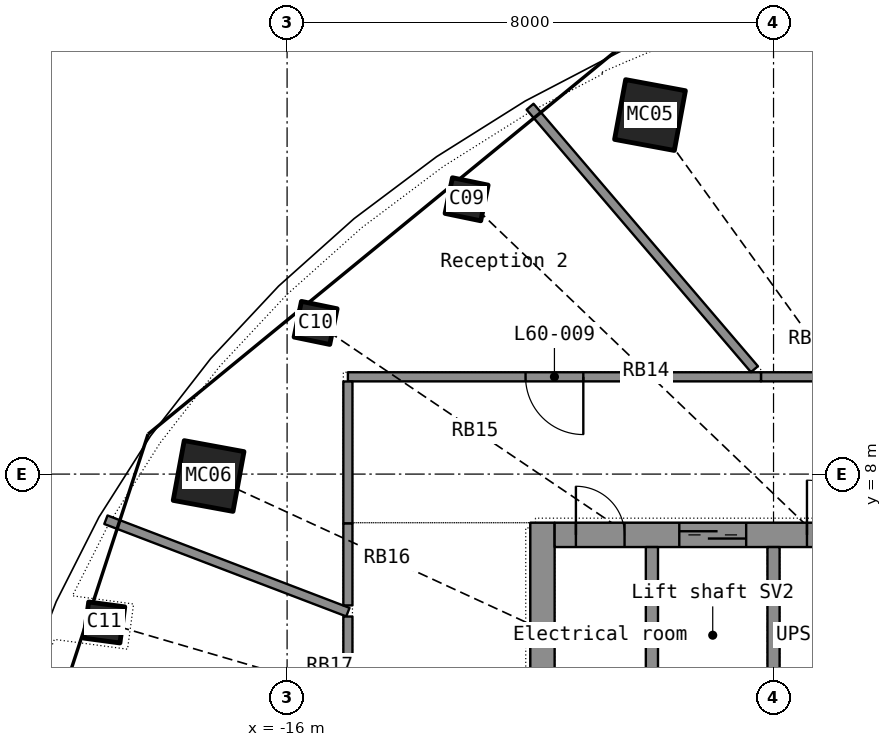
"""IFC4 building model, lengths in metres.
Left out: names, types, materials, properties, quantities, classifications, styles, units other than length and angle.
Written with IfcOpenShell. Run it as: python <this file> out.ifc"""

import sys

from ifc_helpers import new_model, si_unit, direction, frame, frame_2d, origin, origin_2d, place, context, subcontext, project, spatial, rectangle, hollow_rectangle, extrude, element, fill, save


model = new_model("IFC4")
c1 = context("Model", 3, precision=1e-05, world=origin(), true_north=direction((0.0, 1.0)))
c2 = subcontext(c1, "Body", "Model", "MODEL_VIEW")
j1 = project(units=[si_unit("LENGTHUNIT", "METRE"), si_unit("PLANEANGLEUNIT", "RADIAN")], contexts=[c1])
p1 = place(None, origin())
s1 = spatial("IfcSite", under=j1, at=p1, CompositionType="ELEMENT")
p2 = place(p1, origin())
s2 = spatial("IfcBuilding", under=s1, at=p2, CompositionType="ELEMENT")
p3 = place(p2, frame((0.0, 0.0, 246.7)))
s3 = spatial("IfcBuildingStorey", under=s2, at=p3, CompositionType="ELEMENT", Elevation=246.7)
p4 = place(p3, frame((-10.031, 13.905, 0.0), z_axis=(0.017280237, -0.024535299, 0.999549605), x_axis=(0.908759144, 0.417285179, -0.00546782)))
e1 = element("IfcColumn", 1, at=p4, inside=s3, PredefinedType="COLUMN", context=c2, shape_type="SweptSolid", body=[
    extrude(hollow_rectangle(XDim=1.0, YDim=1.0, WallThickness=0.032, at=origin_2d()), origin(), (0.0, 0.0, 1.0), 3.702),
])
p5 = place(p3, frame((-13.048, 12.52, 0.0), z_axis=(0.022226156, -0.021698532, 0.999517469), x_axis=(0.828897347, 0.55936539, -0.006288828)))
e2 = element("IfcColumn", 2, at=p5, inside=s3, PredefinedType="COLUMN", context=c2, shape_type="SweptSolid", body=[
    extrude(hollow_rectangle(XDim=0.6, YDim=0.6, WallThickness=0.025, at=origin_2d()), origin(), (0.0, 0.0, 1.0), 3.702),
])
p6 = place(p3, frame((-15.531, 10.486, 0.0), z_axis=(0.026512179, -0.018202391, 0.999482755), x_axis=(0.720903024, 0.693005453, -0.006501716)))
e3 = element("IfcColumn", 3, at=p6, inside=s3, PredefinedType="COLUMN", context=c2, shape_type="SweptSolid", body=[
    extrude(hollow_rectangle(XDim=0.6, YDim=0.6, WallThickness=0.025, at=origin_2d()), origin(), (0.0, 0.0, 1.0), 3.702),
])
p7 = place(p3, frame((-17.291, 7.969, 0.0), z_axis=(0.030006556, -0.014178922, 0.999449131), x_axis=(0.583833922, 0.81185086, -0.006010986)))
e4 = element("IfcColumn", 4, at=p7, inside=s3, PredefinedType="COLUMN", context=c2, shape_type="SweptSolid", body=[
    extrude(hollow_rectangle(XDim=1.0, YDim=1.0, WallThickness=0.032, at=origin_2d()), origin(), (0.0, 0.0, 1.0), 3.702),
])
p8 = place(p3, frame((-19.006, 5.559, 0.0), z_axis=(0.032511812, -0.009628245, 0.999424974), x_axis=(0.409044671, 0.912503187, -0.004515576)))
e5 = element("IfcColumn", 5, at=p8, inside=s3, PredefinedType="COLUMN", context=c2, shape_type="SweptSolid", body=[
    extrude(hollow_rectangle(XDim=0.6, YDim=0.6, WallThickness=0.025, at=origin_2d()), origin(), (0.0, 0.0, 1.0), 3.702),
])
p9 = place(p3, frame((-11.8, -7.2, 0.0), z_axis=(0.0, 0.0, 1.0), x_axis=(0.0, 1.0, 0.0)))
e6 = element("IfcWall", 6, at=p9, inside=s3, PredefinedType="SHEAR", context=c2, shape_type="SweptSolid", body=[
    extrude(rectangle(XDim=14.4, YDim=0.4, at=frame_2d((7.2, 0.0))), origin(), (0.0, 0.0, 1.0), 3.3),
])
p10 = place(p9, frame((6.5, 0.0, 0.0)))
e7 = element("IfcOpeningElement", 7, at=p10, cuts=e6, PredefinedType="OPENING", context=c2, shape_type="SweptSolid", body=[
    extrude(rectangle(XDim=1.4, YDim=2.2, at=frame_2d((0.7, 1.1))), frame((0.0, 0.21, 0.0), z_axis=(0.0, -1.0, 0.0), x_axis=(1.0, 0.0, 0.0)), (0.0, 0.0, 1.0), 0.42),
])
p11 = place(p3, frame((-11.6, 7.0, 0.0), z_axis=(0.0, 0.0, 1.0), x_axis=(1.0, 0.0, 0.0)))
e8 = element("IfcWall", 8, at=p11, inside=s3, PredefinedType="SHEAR", context=c2, shape_type="SweptSolid", body=[
    extrude(rectangle(XDim=23.2, YDim=0.4, at=frame_2d((11.6, 0.0))), origin(), (0.0, 0.0, 1.0), 3.3),
])
p12 = place(p11, frame((2.05, 0.0, 0.0)))
e9 = element("IfcOpeningElement", 9, at=p12, cuts=e8, PredefinedType="OPENING", context=c2, shape_type="SweptSolid", body=[
    extrude(rectangle(XDim=1.1, YDim=2.2, at=frame_2d((0.55, 1.1))), frame((0.0, 0.21, 0.0), z_axis=(0.0, -1.0, 0.0), x_axis=(1.0, 0.0, 0.0)), (0.0, 0.0, 1.0), 0.42),
])
p13 = place(p11, frame((6.05, 0.0, 0.0)))
e10 = element("IfcOpeningElement", 10, at=p13, cuts=e8, PredefinedType="OPENING", context=c2, shape_type="SweptSolid", body=[
    extrude(rectangle(XDim=1.1, YDim=2.2, at=frame_2d((0.55, 1.1))), frame((0.0, 0.21, 0.0), z_axis=(0.0, -1.0, 0.0), x_axis=(1.0, 0.0, 0.0)), (0.0, 0.0, 1.0), 0.42),
])
p14 = place(p11, frame((8.05, 0.0, 0.0)))
e11 = element("IfcOpeningElement", 11, at=p14, cuts=e8, PredefinedType="OPENING", context=c2, shape_type="SweptSolid", body=[
    extrude(rectangle(XDim=1.1, YDim=2.2, at=frame_2d((0.55, 1.1))), frame((0.0, 0.21, 0.0), z_axis=(0.0, -1.0, 0.0), x_axis=(1.0, 0.0, 0.0)), (0.0, 0.0, 1.0), 0.42),
])
p15 = place(p11, frame((10.05, 0.0, 0.0)))
e12 = element("IfcOpeningElement", 12, at=p15, cuts=e8, PredefinedType="OPENING", context=c2, shape_type="SweptSolid", body=[
    extrude(rectangle(XDim=1.1, YDim=2.2, at=frame_2d((0.55, 1.1))), frame((0.0, 0.21, 0.0), z_axis=(0.0, -1.0, 0.0), x_axis=(1.0, 0.0, 0.0)), (0.0, 0.0, 1.0), 0.42),
])
p16 = place(p11, frame((12.05, 0.0, 0.0)))
e13 = element("IfcOpeningElement", 13, at=p16, cuts=e8, PredefinedType="OPENING", context=c2, shape_type="SweptSolid", body=[
    extrude(rectangle(XDim=1.1, YDim=2.2, at=frame_2d((0.55, 1.1))), frame((0.0, 0.21, 0.0), z_axis=(0.0, -1.0, 0.0), x_axis=(1.0, 0.0, 0.0)), (0.0, 0.0, 1.0), 0.42),
])
p17 = place(p11, frame((14.05, 0.0, 0.0)))
e14 = element("IfcOpeningElement", 14, at=p17, cuts=e8, PredefinedType="OPENING", context=c2, shape_type="SweptSolid", body=[
    extrude(rectangle(XDim=1.1, YDim=2.2, at=frame_2d((0.55, 1.1))), frame((0.0, 0.21, 0.0), z_axis=(0.0, -1.0, 0.0), x_axis=(1.0, 0.0, 0.0)), (0.0, 0.0, 1.0), 0.42),
])
p18 = place(p11, frame((16.05, 0.0, 0.0)))
e15 = element("IfcOpeningElement", 15, at=p18, cuts=e8, PredefinedType="OPENING", context=c2, shape_type="SweptSolid", body=[
    extrude(rectangle(XDim=1.1, YDim=2.2, at=frame_2d((0.55, 1.1))), frame((0.0, 0.21, 0.0), z_axis=(0.0, -1.0, 0.0), x_axis=(1.0, 0.0, 0.0)), (0.0, 0.0, 1.0), 0.42),
])
p19 = place(p11, frame((18.05, 0.0, 0.0)))
e16 = element("IfcOpeningElement", 16, at=p19, cuts=e8, PredefinedType="OPENING", context=c2, shape_type="SweptSolid", body=[
    extrude(rectangle(XDim=1.1, YDim=2.2, at=frame_2d((0.55, 1.1))), frame((0.0, 0.21, 0.0), z_axis=(0.0, -1.0, 0.0), x_axis=(1.0, 0.0, 0.0)), (0.0, 0.0, 1.0), 0.42),
])
p20 = place(p11, frame((20.05, 0.0, 0.0)))
e17 = element("IfcOpeningElement", 17, at=p20, cuts=e8, PredefinedType="OPENING", context=c2, shape_type="SweptSolid", body=[
    extrude(rectangle(XDim=1.1, YDim=2.2, at=frame_2d((0.55, 1.1))), frame((0.0, 0.21, 0.0), z_axis=(0.0, -1.0, 0.0), x_axis=(1.0, 0.0, 0.0)), (0.0, 0.0, 1.0), 0.42),
])
p21 = place(p11, frame((4.15, 0.0, 0.0)))
e18 = element("IfcOpeningElement", 18, at=p21, cuts=e8, PredefinedType="OPENING", context=c2, shape_type="SweptSolid", body=[
    extrude(rectangle(XDim=0.9, YDim=2.1, at=frame_2d((0.45, 1.05))), frame((0.0, 0.21, 0.0), z_axis=(0.0, -1.0, 0.0), x_axis=(1.0, 0.0, 0.0)), (0.0, 0.0, 1.0), 0.42),
])
p22 = place(p11, frame((0.35, 0.0, 0.0)))
e19 = element("IfcOpeningElement", 19, at=p22, cuts=e8, PredefinedType="OPENING", context=c2, shape_type="SweptSolid", body=[
    extrude(rectangle(XDim=0.8, YDim=2.05, at=frame_2d((0.4, 1.025))), frame((0.0, 0.21, 0.0), z_axis=(0.0, -1.0, 0.0), x_axis=(1.0, 0.0, 0.0)), (0.0, 0.0, 1.0), 0.42),
])
p23 = place(p11, frame((22.05, 0.0, 0.0)))
e20 = element("IfcOpeningElement", 20, at=p23, cuts=e8, PredefinedType="OPENING", context=c2, shape_type="SweptSolid", body=[
    extrude(rectangle(XDim=0.8, YDim=2.05, at=frame_2d((0.4, 1.025))), frame((0.0, 0.21, 0.0), z_axis=(0.0, -1.0, 0.0), x_axis=(1.0, 0.0, 0.0)), (0.0, 0.0, 1.0), 0.42),
])
for number, where, z_axis, x_axis in (
    (21, (-10.0, 3.9, 0.0), (0.0, 0.0, 1.0), (0.0, 1.0, 0.0)),
    (22, (-8.0, 3.9, 0.0), (0.0, 0.0, 1.0), (0.0, 1.0, 0.0)),
):
    element("IfcWall", number, at=place(p3, frame(where, z_axis=z_axis, x_axis=x_axis)), inside=s3, PredefinedType="SHEAR", context=c2, shape_type="SweptSolid", body=[
        extrude(rectangle(XDim=2.9, YDim=0.2, at=frame_2d((1.45, 0.0))), origin(), (0.0, 0.0, 1.0), 3.3),
    ])
p24 = place(p3, frame((3.14, 9.6, 0.0), z_axis=(0.0, 0.0, 1.0), x_axis=(-1.0, 0.0, 0.0)))
e23 = element("IfcWall", 23, at=p24, inside=s3, PredefinedType="PARTITIONING", context=c2, shape_type="SweptSolid", body=[
    extrude(rectangle(XDim=11.347, YDim=0.15, at=frame_2d((5.673, 0.0))), origin(), (0.0, 0.0, 1.0), 2.4),
])
p25 = place(p24, frame((4.873, 0.0, 0.0)))
e24 = element("IfcOpeningElement", 24, at=p25, cuts=e23, PredefinedType="OPENING", context=c2, shape_type="SweptSolid", body=[
    extrude(rectangle(XDim=1.6, YDim=2.4, at=frame_2d((0.8, 1.2))), frame((0.0, 0.085, 0.0), z_axis=(0.0, -1.0, 0.0), x_axis=(1.0, 0.0, 0.0)), (0.0, 0.0, 1.0), 0.17),
])
p26 = place(p3, frame((-8.207, 9.6, 0.0), z_axis=(0.0, 0.0, 1.0), x_axis=(-1.0, 0.0, 0.0)))
e25 = element("IfcWall", 25, at=p26, inside=s3, PredefinedType="PARTITIONING", context=c2, shape_type="SweptSolid", body=[
    extrude(rectangle(XDim=6.793, YDim=0.15, at=frame_2d((3.397, 0.0))), origin(), (0.0, 0.0, 1.0), 2.4),
])
p27 = place(p26, frame((2.922, 0.0, 0.0)))
e26 = element("IfcOpeningElement", 26, at=p27, cuts=e25, PredefinedType="OPENING", context=c2, shape_type="SweptSolid", body=[
    extrude(rectangle(XDim=0.95, YDim=2.15, at=frame_2d((0.475, 1.075))), frame((0.0, 0.085, 0.0), z_axis=(0.0, -1.0, 0.0), x_axis=(1.0, 0.0, 0.0)), (0.0, 0.0, 1.0), 0.17),
])
p28 = place(p3, frame((-12.004, 14.042, 0.0), z_axis=(0.0, 0.0, 1.0), x_axis=(0.649778345, -0.760123741, 0.0)))
e27 = element("IfcWall", 27, at=p28, inside=s3, PredefinedType="PARTITIONING", context=c2, shape_type="SweptSolid", body=[
    extrude(rectangle(XDim=5.679, YDim=0.15, at=frame_2d((2.84, 0.0))), origin(), (0.0, 0.0, 1.0), 2.4),
])
p29 = place(p3, frame((-15.0, 5.729, 0.0), z_axis=(0.0, 0.0, 1.0), x_axis=(-0.934173237, 0.35681979, 0.0)))
e28 = element("IfcWall", 28, at=p29, inside=s3, PredefinedType="PARTITIONING", context=c2, shape_type="SweptSolid", body=[
    extrude(rectangle(XDim=4.26, YDim=0.15, at=frame_2d((2.13, 0.0))), origin(), (0.0, 0.0, 1.0), 2.4),
])
p30 = place(p3, frame((-15.0, 5.657, 0.0), z_axis=(0.0, 0.0, 1.0), x_axis=(0.0, -1.0, 0.0)))
e29 = element("IfcWall", 29, at=p30, inside=s3, PredefinedType="PARTITIONING", context=c2, shape_type="SweptSolid", body=[
    extrude(rectangle(XDim=4.007, YDim=0.15, at=frame_2d((2.004, 0.0))), origin(), (0.0, 0.0, 1.0), 2.4),
])
p31 = place(p30, frame((1.504, 0.0, 0.0)))
e30 = element("IfcOpeningElement", 30, at=p31, cuts=e29, PredefinedType="OPENING", context=c2, shape_type="SweptSolid", body=[
    extrude(rectangle(XDim=1.0, YDim=2.4, at=frame_2d((0.5, 1.2))), frame((0.0, 0.085, 0.0), z_axis=(0.0, -1.0, 0.0), x_axis=(1.0, 0.0, 0.0)), (0.0, 0.0, 1.0), 0.17),
])
p32 = place(p3, frame((-15.0, 9.523, 0.0), z_axis=(0.0, 0.0, 1.0), x_axis=(0.0, -1.0, 0.0)))
e31 = element("IfcWall", 31, at=p32, inside=s3, PredefinedType="PARTITIONING", context=c2, shape_type="SweptSolid", body=[
    extrude(rectangle(XDim=2.335, YDim=0.15, at=frame_2d((1.167, 0.0))), origin(), (0.0, 0.0, 1.0), 2.4),
])
p33 = place(p3, frame((-15.0, 7.187, 0.0), z_axis=(0.0, 0.0, 1.0), x_axis=(0.0, -1.0, 0.0)))
e32 = element("IfcWall", 32, at=p33, inside=s3, PredefinedType="PARTITIONING", context=c2, shape_type="SweptSolid", body=[
    extrude(rectangle(XDim=1.347, YDim=0.15, at=frame_2d((0.673, 0.0))), origin(), (0.0, 0.0, 1.0), 2.4),
])
p34 = place(p12, origin())
e33 = element("IfcDoor", 33, at=p34, inside=s3, OperationType="DOUBLE_DOOR_SLIDING", PredefinedType="DOOR", context=c2, shape_type="SweptSolid", body=[
    extrude(rectangle(XDim=1.1, YDim=2.2, at=frame_2d((0.55, 1.1))), frame((0.0, 0.025, 0.0), z_axis=(0.0, -1.0, 0.0), x_axis=(1.0, 0.0, 0.0)), (0.0, 0.0, 1.0), 0.05),
])
fill(e9, e33)
p35 = place(p21, origin())
e34 = element("IfcDoor", 34, at=p35, inside=s3, OperationType="SINGLE_SWING_LEFT", PredefinedType="DOOR", context=c2, shape_type="SweptSolid", body=[
    extrude(rectangle(XDim=0.9, YDim=2.1, at=frame_2d((0.45, 1.05))), frame((0.0, 0.025, 0.0), z_axis=(0.0, -1.0, 0.0), x_axis=(1.0, 0.0, 0.0)), (0.0, 0.0, 1.0), 0.05),
])
fill(e18, e34)
p36 = place(p22, origin())
e35 = element("IfcDoor", 35, at=p36, inside=s3, OperationType="SINGLE_SWING_LEFT", PredefinedType="DOOR", context=c2, shape_type="SweptSolid", body=[
    extrude(rectangle(XDim=0.8, YDim=2.05, at=frame_2d((0.4, 1.025))), frame((0.0, 0.025, 0.0), z_axis=(0.0, -1.0, 0.0), x_axis=(1.0, 0.0, 0.0)), (0.0, 0.0, 1.0), 0.05),
])
fill(e19, e35)
p37 = place(p27, origin())
e36 = element("IfcDoor", 36, at=p37, inside=s3, OperationType="SINGLE_SWING_LEFT", PredefinedType="DOOR", context=c2, shape_type="SweptSolid", body=[
    extrude(rectangle(XDim=0.95, YDim=2.15, at=frame_2d((0.475, 1.075))), frame((0.0, 0.025, 0.0), z_axis=(0.0, -1.0, 0.0), x_axis=(1.0, 0.0, 0.0)), (0.0, 0.0, 1.0), 0.05),
])
fill(e26, e36)
save(model, sys.argv[1])
